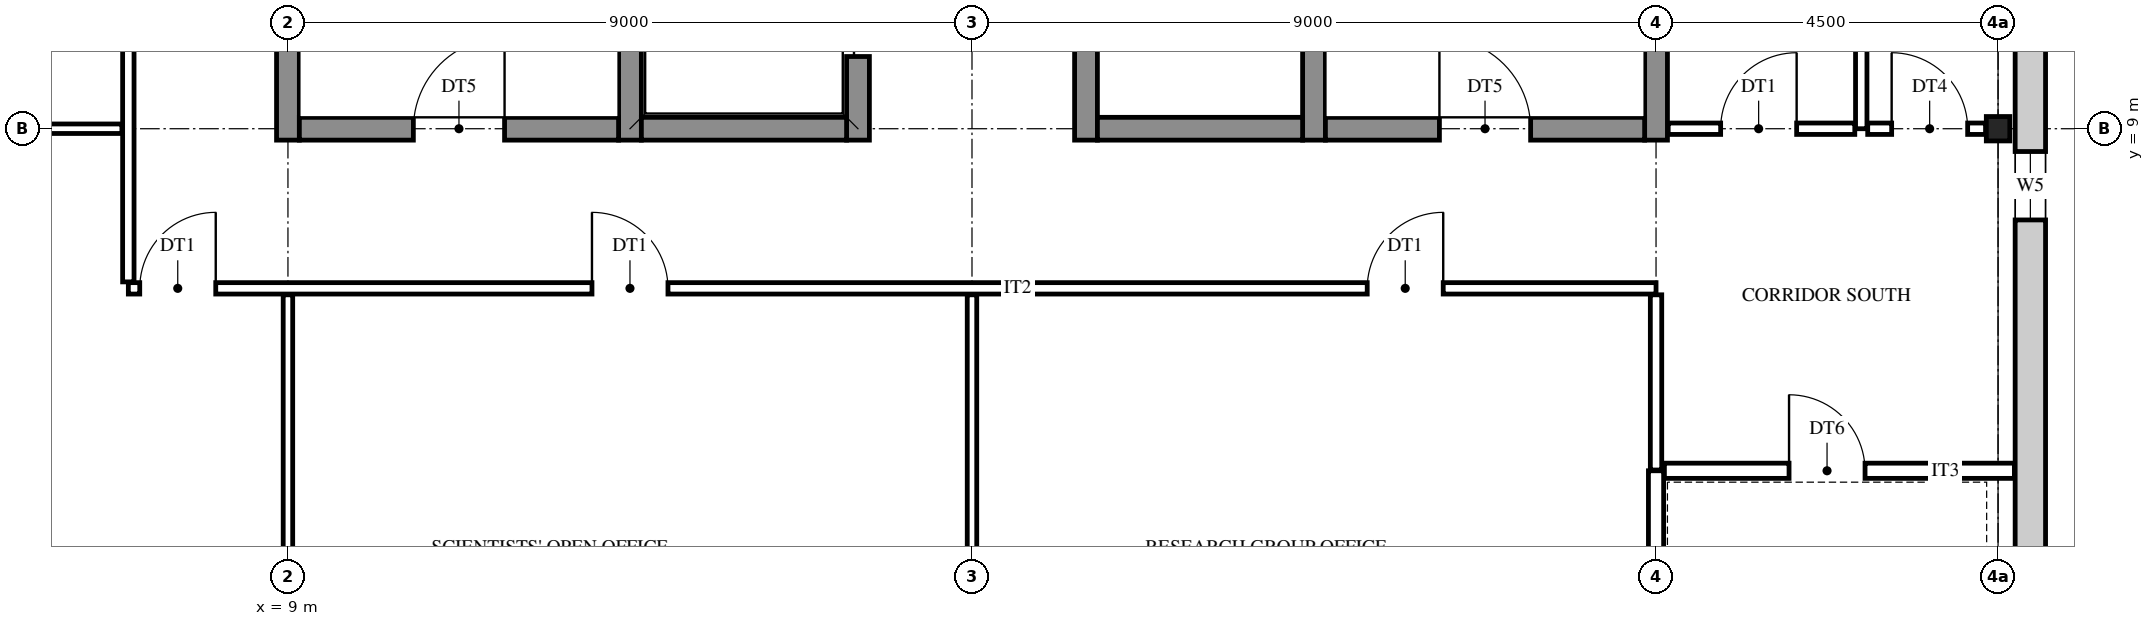
"""IFC4 building model, lengths in metres.
Left out: names, types, materials, properties, quantities, classifications, styles, units other than length and angle.
Written with IfcOpenShell. Run it as: python <this file> out.ifc"""

import sys

from ifc_helpers import new_model, si_unit, direction, frame, frame_2d, origin, origin_2d, place, context, subcontext, project, spatial, rectangle, i_section, extrude, element, fill, save


model = new_model("IFC4")
c1 = context("Model", 3, precision=1e-05, world=origin(), true_north=direction((0.0, 1.0)))
c2 = subcontext(c1, "Body", "Model", "MODEL_VIEW")
j1 = project(units=[si_unit("LENGTHUNIT", "METRE"), si_unit("PLANEANGLEUNIT", "RADIAN")], contexts=[c1])
p1 = place(None, origin())
s1 = spatial("IfcSite", under=j1, at=p1, CompositionType="ELEMENT")
p2 = place(p1, origin())
s2 = spatial("IfcBuilding", under=s1, at=p2, CompositionType="ELEMENT")
p3 = place(p2, frame((0.0, 0.0, 52.8)))
s3 = spatial("IfcBuildingStorey", under=s2, at=p3, CompositionType="ELEMENT", Elevation=52.8)
p4 = place(p3, frame((31.5, 9.0, 0.0), z_axis=(0.0, 0.0, 1.0), x_axis=(1.0, 0.0, 0.0)))
e1 = element("IfcColumn", 1, at=p4, inside=s3, PredefinedType="COLUMN", context=c2, shape_type="SweptSolid", body=[
    extrude(i_section(OverallWidth=0.309, OverallDepth=0.321, WebThickness=0.014, FlangeThickness=0.022, FilletRadius=0.017, at=origin_2d()), origin(), (0.0, 0.0, 1.0), 4.2),
])
for number, where, z_axis, x_axis in (
    (2, (9.0, 8.85, 0.0), (0.0, 0.0, 1.0), (0.0, 1.0, 0.0)),
    (3, (13.5, 8.85, 0.0), (0.0, 0.0, 1.0), (0.0, 1.0, 0.0)),
):
    element("IfcWall", number, at=place(p3, frame(where, z_axis=z_axis, x_axis=x_axis)), inside=s3, PredefinedType="SHEAR", context=c2, shape_type="SweptSolid", body=[
        extrude(rectangle(XDim=9.3, YDim=0.3, at=frame_2d((4.65, 0.0))), origin(), (0.0, 0.0, 1.0), 4.2),
    ])
p5 = place(p3, frame((16.5, 8.85, 0.0), z_axis=(0.0, 0.0, 1.0), x_axis=(0.0, 1.0, 0.0)))
e4 = element("IfcWall", 4, at=p5, inside=s3, PredefinedType="SHEAR", context=c2, shape_type="SweptSolid", body=[
    extrude(rectangle(XDim=9.3, YDim=0.3, at=frame_2d((4.65, 0.0))), origin(), (0.0, 0.0, 1.0), 4.2),
])
p6 = place(p5, frame((1.1, 0.0, 0.0)))
e5 = element("IfcOpeningElement", 5, at=p6, cuts=e4, PredefinedType="OPENING", context=c2, shape_type="SweptSolid", body=[
    extrude(rectangle(XDim=1.1, YDim=2.1, at=frame_2d((0.55, 1.05))), frame((0.0, 0.16, 0.0), z_axis=(0.0, -1.0, 0.0), x_axis=(1.0, 0.0, 0.0)), (0.0, 0.0, 1.0), 0.32),
])
p7 = place(p5, frame((4.1, 0.0, 0.0)))
e6 = element("IfcOpeningElement", 6, at=p7, cuts=e4, PredefinedType="OPENING", context=c2, shape_type="SweptSolid", body=[
    extrude(rectangle(XDim=1.1, YDim=2.1, at=frame_2d((0.55, 1.05))), frame((0.0, 0.16, 0.0), z_axis=(0.0, -1.0, 0.0), x_axis=(1.0, 0.0, 0.0)), (0.0, 0.0, 1.0), 0.32),
])
p8 = place(p3, frame((19.5, 8.85, 0.0), z_axis=(0.0, 0.0, 1.0), x_axis=(0.0, 1.0, 0.0)))
e7 = element("IfcWall", 7, at=p8, inside=s3, PredefinedType="SHEAR", context=c2, shape_type="SweptSolid", body=[
    extrude(rectangle(XDim=9.3, YDim=0.3, at=frame_2d((4.65, 0.0))), origin(), (0.0, 0.0, 1.0), 4.2),
])
p9 = place(p8, frame((3.95, 0.0, 0.0)))
e8 = element("IfcOpeningElement", 8, at=p9, cuts=e7, PredefinedType="OPENING", context=c2, shape_type="SweptSolid", body=[
    extrude(rectangle(XDim=1.4, YDim=2.1, at=frame_2d((0.7, 1.05))), frame((0.0, 0.16, 0.0), z_axis=(0.0, -1.0, 0.0), x_axis=(1.0, 0.0, 0.0)), (0.0, 0.0, 1.0), 0.32),
])
p10 = place(p8, frame((7.1, 0.0, 0.0)))
e9 = element("IfcOpeningElement", 9, at=p10, cuts=e7, PredefinedType="OPENING", context=c2, shape_type="SweptSolid", body=[
    extrude(rectangle(XDim=1.1, YDim=2.1, at=frame_2d((0.55, 1.05))), frame((0.0, 0.16, 0.0), z_axis=(0.0, -1.0, 0.0), x_axis=(1.0, 0.0, 0.0)), (0.0, 0.0, 1.0), 0.32),
])
for number, where, z_axis, x_axis in (
    (10, (22.5, 8.85, 0.0), (0.0, 0.0, 1.0), (0.0, 1.0, 0.0)),
    (11, (27.0, 8.85, 0.0), (0.0, 0.0, 1.0), (0.0, 1.0, 0.0)),
):
    element("IfcWall", number, at=place(p3, frame(where, z_axis=z_axis, x_axis=x_axis)), inside=s3, PredefinedType="SHEAR", context=c2, shape_type="SweptSolid", body=[
        extrude(rectangle(XDim=9.3, YDim=0.3, at=frame_2d((4.65, 0.0))), origin(), (0.0, 0.0, 1.0), 4.2),
    ])
p11 = place(p3, frame((9.15, 9.0, 0.0), z_axis=(0.0, 0.0, 1.0), x_axis=(1.0, 0.0, 0.0)))
e12 = element("IfcWall", 12, at=p11, inside=s3, PredefinedType="SHEAR", context=c2, shape_type="SweptSolid", body=[
    extrude(rectangle(XDim=4.2, YDim=0.3, at=frame_2d((2.1, 0.0))), origin(), (0.0, 0.0, 1.0), 4.2),
])
p12 = place(p11, frame((1.5, 0.0, 0.0)))
e13 = element("IfcOpeningElement", 13, at=p12, cuts=e12, PredefinedType="OPENING", context=c2, shape_type="SweptSolid", body=[
    extrude(rectangle(XDim=1.2, YDim=2.1, at=frame_2d((0.6, 1.05))), frame((0.0, 0.16, 0.0), z_axis=(0.0, -1.0, 0.0), x_axis=(1.0, 0.0, 0.0)), (0.0, 0.0, 1.0), 0.32),
])
for number, where, z_axis, x_axis in (
    (14, (13.65, 9.0, 0.0), (0.0, 0.0, 1.0), (1.0, 0.0, 0.0)),
    (15, (19.65, 9.0, 0.0), (0.0, 0.0, 1.0), (1.0, 0.0, 0.0)),
):
    element("IfcWall", number, at=place(p3, frame(where, z_axis=z_axis, x_axis=x_axis)), inside=s3, PredefinedType="SHEAR", context=c2, shape_type="SweptSolid", body=[
        extrude(rectangle(XDim=2.7, YDim=0.3, at=frame_2d((1.35, 0.0))), origin(), (0.0, 0.0, 1.0), 4.2),
    ])
p13 = place(p3, frame((22.65, 9.0, 0.0), z_axis=(0.0, 0.0, 1.0), x_axis=(1.0, 0.0, 0.0)))
e16 = element("IfcWall", 16, at=p13, inside=s3, PredefinedType="SHEAR", context=c2, shape_type="SweptSolid", body=[
    extrude(rectangle(XDim=4.2, YDim=0.3, at=frame_2d((2.1, 0.0))), origin(), (0.0, 0.0, 1.0), 4.2),
])
p14 = place(p13, frame((1.5, 0.0, 0.0)))
e17 = element("IfcOpeningElement", 17, at=p14, cuts=e16, PredefinedType="OPENING", context=c2, shape_type="SweptSolid", body=[
    extrude(rectangle(XDim=1.2, YDim=2.1, at=frame_2d((0.6, 1.05))), frame((0.0, 0.16, 0.0), z_axis=(0.0, -1.0, 0.0), x_axis=(1.0, 0.0, 0.0)), (0.0, 0.0, 1.0), 0.32),
])
p15 = place(p3, frame((31.925, 27.225, 0.0), z_axis=(0.0, 0.0, 1.0), x_axis=(0.0, -1.0, 0.0)))
e18 = element("IfcWall", 18, at=p15, inside=s3, PredefinedType="STANDARD", context=c2, shape_type="SweptSolid", body=[
    extrude(rectangle(XDim=27.45, YDim=0.4, at=frame_2d((13.725, 0.0))), origin(), (0.0, 0.0, 1.0), 4.2),
])
p16 = place(p15, frame((26.025, 0.0, 0.9)))
e19 = element("IfcOpeningElement", 19, at=p16, cuts=e18, PredefinedType="OPENING", context=c2, shape_type="SweptSolid", body=[
    extrude(rectangle(XDim=0.9, YDim=2.0, at=frame_2d((0.45, 1.0))), frame((0.0, 0.21, 0.0), z_axis=(0.0, -1.0, 0.0), x_axis=(1.0, 0.0, 0.0)), (0.0, 0.0, 1.0), 0.42),
])
p17 = place(p15, frame((18.525, 0.0, 0.9)))
e20 = element("IfcOpeningElement", 20, at=p17, cuts=e18, PredefinedType="OPENING", context=c2, shape_type="SweptSolid", body=[
    extrude(rectangle(XDim=0.9, YDim=2.0, at=frame_2d((0.45, 1.0))), frame((0.0, 0.21, 0.0), z_axis=(0.0, -1.0, 0.0), x_axis=(1.0, 0.0, 0.0)), (0.0, 0.0, 1.0), 0.42),
])
p18 = place(p15, frame((15.675, 0.0, 1.6)))
e21 = element("IfcOpeningElement", 21, at=p18, cuts=e18, PredefinedType="OPENING", context=c2, shape_type="SweptSolid", body=[
    extrude(rectangle(XDim=0.6, YDim=0.9, at=frame_2d((0.3, 0.45))), frame((0.0, 0.21, 0.0), z_axis=(0.0, -1.0, 0.0), x_axis=(1.0, 0.0, 0.0)), (0.0, 0.0, 1.0), 0.42),
])
p19 = place(p15, frame((11.175, 0.0, 1.6)))
e22 = element("IfcOpeningElement", 22, at=p19, cuts=e18, PredefinedType="OPENING", context=c2, shape_type="SweptSolid", body=[
    extrude(rectangle(XDim=0.6, YDim=0.9, at=frame_2d((0.3, 0.45))), frame((0.0, 0.21, 0.0), z_axis=(0.0, -1.0, 0.0), x_axis=(1.0, 0.0, 0.0)), (0.0, 0.0, 1.0), 0.42),
])
p20 = place(p15, frame((8.025, 0.0, 0.9)))
e23 = element("IfcOpeningElement", 23, at=p20, cuts=e18, PredefinedType="OPENING", context=c2, shape_type="SweptSolid", body=[
    extrude(rectangle(XDim=0.9, YDim=2.0, at=frame_2d((0.45, 1.0))), frame((0.0, 0.21, 0.0), z_axis=(0.0, -1.0, 0.0), x_axis=(1.0, 0.0, 0.0)), (0.0, 0.0, 1.0), 0.42),
])
p21 = place(p15, frame((0.525, 0.0, 0.9)))
e24 = element("IfcOpeningElement", 24, at=p21, cuts=e18, PredefinedType="OPENING", context=c2, shape_type="SweptSolid", body=[
    extrude(rectangle(XDim=0.9, YDim=2.0, at=frame_2d((0.45, 1.0))), frame((0.0, 0.21, 0.0), z_axis=(0.0, -1.0, 0.0), x_axis=(1.0, 0.0, 0.0)), (0.0, 0.0, 1.0), 0.42),
])
p22 = place(p3, frame((6.9, 6.985, 0.0), z_axis=(0.0, 0.0, 1.0), x_axis=(0.0, 1.0, 0.0)))
e25 = element("IfcWall", 25, at=p22, inside=s3, PredefinedType="PARTITIONING", context=c2, shape_type="SweptSolid", body=[
    extrude(rectangle(XDim=13.03, YDim=0.15, at=frame_2d((6.515, 0.0))), origin(), (0.0, 0.0, 1.0), 3.542),
])
p23 = place(p22, frame((11.565, 0.0, 0.0)))
e26 = element("IfcOpeningElement", 26, at=p23, cuts=e25, PredefinedType="OPENING", context=c2, shape_type="SweptSolid", body=[
    extrude(rectangle(XDim=1.0, YDim=2.1, at=frame_2d((0.5, 1.05))), frame((0.0, 0.085, 0.0), z_axis=(0.0, -1.0, 0.0), x_axis=(1.0, 0.0, 0.0)), (0.0, 0.0, 1.0), 0.17),
])
p24 = place(p22, frame((3.765, 0.0, 0.0)))
e27 = element("IfcOpeningElement", 27, at=p24, cuts=e25, PredefinedType="OPENING", context=c2, shape_type="SweptSolid", body=[
    extrude(rectangle(XDim=1.0, YDim=2.1, at=frame_2d((0.5, 1.05))), frame((0.0, 0.085, 0.0), z_axis=(0.0, -1.0, 0.0), x_axis=(1.0, 0.0, 0.0)), (0.0, 0.0, 1.0), 0.17),
])
p25 = place(p22, frame((8.265, 0.0, 0.0)))
e28 = element("IfcOpeningElement", 28, at=p25, cuts=e25, PredefinedType="OPENING", context=c2, shape_type="SweptSolid", body=[
    extrude(rectangle(XDim=1.0, YDim=2.1, at=frame_2d((0.5, 1.05))), frame((0.0, 0.085, 0.0), z_axis=(0.0, -1.0, 0.0), x_axis=(1.0, 0.0, 0.0)), (0.0, 0.0, 1.0), 0.17),
])
for number, where, z_axis, x_axis in (
    (29, (9.0, 0.17, 0.0), (0.0, 0.0, 1.0), (0.0, 1.0, 0.0)),
    (30, (18.0, 0.17, 0.0), (0.0, 0.0, 1.0), (0.0, 1.0, 0.0)),
):
    element("IfcWall", number, at=place(p3, frame(where, z_axis=z_axis, x_axis=x_axis)), inside=s3, PredefinedType="PARTITIONING", context=c2, shape_type="SweptSolid", body=[
        extrude(rectangle(XDim=6.645, YDim=0.125, at=frame_2d((3.322, 0.0))), origin(), (0.0, 0.0, 1.0), 3.542),
    ])
p26 = place(p3, frame((27.0, 0.17, 0.0), z_axis=(0.0, 0.0, 1.0), x_axis=(0.0, 1.0, 0.0)))
e31 = element("IfcWall", 31, at=p26, inside=s3, PredefinedType="PARTITIONING", context=c2, shape_type="SweptSolid", body=[
    extrude(rectangle(XDim=4.33, YDim=0.2, at=frame_2d((2.165, 0.0))), origin(), (0.0, 0.0, 1.0), 3.542),
])
p27 = place(p3, frame((27.0, 4.51, 0.0), z_axis=(0.0, 0.0, 1.0), x_axis=(0.0, 1.0, 0.0)))
e32 = element("IfcWall", 32, at=p27, inside=s3, PredefinedType="PARTITIONING", context=c2, shape_type="SweptSolid", body=[
    extrude(rectangle(XDim=2.305, YDim=0.15, at=frame_2d((1.152, 0.0))), origin(), (0.0, 0.0, 1.0), 3.542),
])
p28 = place(p3, frame((29.7, 9.0, 0.0), z_axis=(0.0, 0.0, 1.0), x_axis=(0.0, 1.0, 0.0)))
e33 = element("IfcWall", 33, at=p28, inside=s3, PredefinedType="PARTITIONING", context=c2, shape_type="SweptSolid", body=[
    extrude(rectangle(XDim=6.3, YDim=0.15, at=frame_2d((3.15, 0.0))), origin(), (0.0, 0.0, 1.0), 3.542),
])
p29 = place(p28, frame((4.0, 0.0, 0.0)))
e34 = element("IfcOpeningElement", 34, at=p29, cuts=e33, PredefinedType="OPENING", context=c2, shape_type="SweptSolid", body=[
    extrude(rectangle(XDim=1.0, YDim=2.1, at=frame_2d((0.5, 1.05))), frame((0.0, 0.085, 0.0), z_axis=(0.0, -1.0, 0.0), x_axis=(1.0, 0.0, 0.0)), (0.0, 0.0, 1.0), 0.17),
])
p30 = place(p3, frame((27.11, 4.5, 0.0), z_axis=(0.0, 0.0, 1.0), x_axis=(1.0, 0.0, 0.0)))
e35 = element("IfcWall", 35, at=p30, inside=s3, PredefinedType="PARTITIONING", context=c2, shape_type="SweptSolid", body=[
    extrude(rectangle(XDim=4.605, YDim=0.2, at=frame_2d((2.302, 0.0))), origin(), (0.0, 0.0, 1.0), 3.542),
])
p31 = place(p30, frame((1.64, 0.0, 0.0)))
e36 = element("IfcOpeningElement", 36, at=p31, cuts=e35, PredefinedType="OPENING", context=c2, shape_type="SweptSolid", body=[
    extrude(rectangle(XDim=1.0, YDim=2.1, at=frame_2d((0.5, 1.05))), frame((0.0, 0.11, 0.0), z_axis=(0.0, -1.0, 0.0), x_axis=(1.0, 0.0, 0.0)), (0.0, 0.0, 1.0), 0.22),
])
p32 = place(p3, frame((6.9, 6.9, 0.0), z_axis=(0.0, 0.0, 1.0), x_axis=(1.0, 0.0, 0.0)))
e37 = element("IfcWall", 37, at=p32, inside=s3, PredefinedType="PARTITIONING", context=c2, shape_type="SweptSolid", body=[
    extrude(rectangle(XDim=20.1, YDim=0.15, at=frame_2d((10.05, 0.0))), origin(), (0.0, 0.0, 1.0), 3.542),
])
p33 = place(p32, frame((0.15, 0.0, 0.0)))
e38 = element("IfcOpeningElement", 38, at=p33, cuts=e37, PredefinedType="OPENING", context=c2, shape_type="SweptSolid", body=[
    extrude(rectangle(XDim=1.0, YDim=2.1, at=frame_2d((0.5, 1.05))), frame((0.0, 0.085, 0.0), z_axis=(0.0, -1.0, 0.0), x_axis=(1.0, 0.0, 0.0)), (0.0, 0.0, 1.0), 0.17),
])
p34 = place(p32, frame((6.1, 0.0, 0.0)))
e39 = element("IfcOpeningElement", 39, at=p34, cuts=e37, PredefinedType="OPENING", context=c2, shape_type="SweptSolid", body=[
    extrude(rectangle(XDim=1.0, YDim=2.1, at=frame_2d((0.5, 1.05))), frame((0.0, 0.085, 0.0), z_axis=(0.0, -1.0, 0.0), x_axis=(1.0, 0.0, 0.0)), (0.0, 0.0, 1.0), 0.17),
])
p35 = place(p32, frame((16.3, 0.0, 0.0)))
e40 = element("IfcOpeningElement", 40, at=p35, cuts=e37, PredefinedType="OPENING", context=c2, shape_type="SweptSolid", body=[
    extrude(rectangle(XDim=1.0, YDim=2.1, at=frame_2d((0.5, 1.05))), frame((0.0, 0.085, 0.0), z_axis=(0.0, -1.0, 0.0), x_axis=(1.0, 0.0, 0.0)), (0.0, 0.0, 1.0), 0.17),
])
p36 = place(p3, frame((0.165, 9.0, 0.0), z_axis=(0.0, 0.0, 1.0), x_axis=(1.0, 0.0, 0.0)))
e41 = element("IfcWall", 41, at=p36, inside=s3, PredefinedType="PARTITIONING", context=c2, shape_type="SweptSolid", body=[
    extrude(rectangle(XDim=6.65, YDim=0.125, at=frame_2d((3.325, 0.0))), origin(), (0.0, 0.0, 1.0), 3.542),
])
p37 = place(p3, frame((27.16, 9.0, 0.0), z_axis=(0.0, 0.0, 1.0), x_axis=(1.0, 0.0, 0.0)))
e42 = element("IfcWall", 42, at=p37, inside=s3, PredefinedType="PARTITIONING", context=c2, shape_type="SweptSolid", body=[
    extrude(rectangle(XDim=2.455, YDim=0.15, at=frame_2d((1.228, 0.0))), origin(), (0.0, 0.0, 1.0), 3.542),
])
p38 = place(p37, frame((0.69, 0.0, 0.0)))
e43 = element("IfcOpeningElement", 43, at=p38, cuts=e42, PredefinedType="OPENING", context=c2, shape_type="SweptSolid", body=[
    extrude(rectangle(XDim=1.0, YDim=2.1, at=frame_2d((0.5, 1.05))), frame((0.0, 0.085, 0.0), z_axis=(0.0, -1.0, 0.0), x_axis=(1.0, 0.0, 0.0)), (0.0, 0.0, 1.0), 0.17),
])
p39 = place(p3, frame((29.785, 9.0, 0.0), z_axis=(0.0, 0.0, 1.0), x_axis=(1.0, 0.0, 0.0)))
e44 = element("IfcWall", 44, at=p39, inside=s3, PredefinedType="PARTITIONING", context=c2, shape_type="SweptSolid", body=[
    extrude(rectangle(XDim=1.551, YDim=0.15, at=frame_2d((0.775, 0.0))), origin(), (0.0, 0.0, 1.0), 3.542),
])
p40 = place(p39, frame((0.315, 0.0, 0.0)))
e45 = element("IfcOpeningElement", 45, at=p40, cuts=e44, PredefinedType="OPENING", context=c2, shape_type="SweptSolid", body=[
    extrude(rectangle(XDim=1.0, YDim=2.1, at=frame_2d((0.5, 1.05))), frame((0.0, 0.085, 0.0), z_axis=(0.0, -1.0, 0.0), x_axis=(1.0, 0.0, 0.0)), (0.0, 0.0, 1.0), 0.17),
])
p41 = place(p17, origin())
e46 = element("IfcWindow", 46, at=p41, inside=s3, PartitioningType="SINGLE_PANEL", PredefinedType="WINDOW", context=c2, shape_type="SweptSolid", body=[
    extrude(rectangle(XDim=0.9, YDim=2.0, at=frame_2d((0.45, 1.0))), frame((0.0, 0.03, 0.0), z_axis=(0.0, -1.0, 0.0), x_axis=(1.0, 0.0, 0.0)), (0.0, 0.0, 1.0), 0.06),
])
fill(e20, e46)
p42 = place(p12, origin())
e47 = element("IfcDoor", 47, at=p42, inside=s3, OperationType="SINGLE_SWING_RIGHT", PredefinedType="DOOR", context=c2, shape_type="SweptSolid", body=[
    extrude(rectangle(XDim=1.2, YDim=2.1, at=frame_2d((0.6, 1.05))), frame((0.0, 0.025, 0.0), z_axis=(0.0, -1.0, 0.0), x_axis=(1.0, 0.0, 0.0)), (0.0, 0.0, 1.0), 0.05),
])
fill(e13, e47)
p43 = place(p14, origin())
e48 = element("IfcDoor", 48, at=p43, inside=s3, OperationType="SINGLE_SWING_LEFT", PredefinedType="DOOR", context=c2, shape_type="SweptSolid", body=[
    extrude(rectangle(XDim=1.2, YDim=2.1, at=frame_2d((0.6, 1.05))), frame((0.0, 0.025, 0.0), z_axis=(0.0, -1.0, 0.0), x_axis=(1.0, 0.0, 0.0)), (0.0, 0.0, 1.0), 0.05),
])
fill(e17, e48)
p44 = place(p38, origin())
e49 = element("IfcDoor", 49, at=p44, inside=s3, OperationType="SINGLE_SWING_RIGHT", PredefinedType="DOOR", context=c2, shape_type="SweptSolid", body=[
    extrude(rectangle(XDim=1.0, YDim=2.1, at=frame_2d((0.5, 1.05))), frame((0.0, 0.025, 0.0), z_axis=(0.0, -1.0, 0.0), x_axis=(1.0, 0.0, 0.0)), (0.0, 0.0, 1.0), 0.05),
])
fill(e43, e49)
p45 = place(p40, origin())
e50 = element("IfcDoor", 50, at=p45, inside=s3, OperationType="SINGLE_SWING_LEFT", PredefinedType="DOOR", context=c2, shape_type="SweptSolid", body=[
    extrude(rectangle(XDim=1.0, YDim=2.1, at=frame_2d((0.5, 1.05))), frame((0.0, 0.025, 0.0), z_axis=(0.0, -1.0, 0.0), x_axis=(1.0, 0.0, 0.0)), (0.0, 0.0, 1.0), 0.05),
])
fill(e45, e50)
p46 = place(p31, frame((1.0, 0.0, 0.0), z_axis=(0.0, 0.0, 1.0), x_axis=(-1.0, 0.0, 0.0)))
e51 = element("IfcDoor", 51, at=p46, inside=s3, OperationType="SINGLE_SWING_LEFT", PredefinedType="DOOR", context=c2, shape_type="SweptSolid", body=[
    extrude(rectangle(XDim=1.0, YDim=2.1, at=frame_2d((0.5, 1.05))), frame((0.0, 0.025, 0.0), z_axis=(0.0, -1.0, 0.0), x_axis=(1.0, 0.0, 0.0)), (0.0, 0.0, 1.0), 0.05),
])
fill(e36, e51)
p47 = place(p33, frame((1.0, 0.0, 0.0), z_axis=(0.0, 0.0, 1.0), x_axis=(-1.0, 0.0, 0.0)))
e52 = element("IfcDoor", 52, at=p47, inside=s3, OperationType="SINGLE_SWING_RIGHT", PredefinedType="DOOR", context=c2, shape_type="SweptSolid", body=[
    extrude(rectangle(XDim=1.0, YDim=2.1, at=frame_2d((0.5, 1.05))), frame((0.0, 0.025, 0.0), z_axis=(0.0, -1.0, 0.0), x_axis=(1.0, 0.0, 0.0)), (0.0, 0.0, 1.0), 0.05),
])
fill(e38, e52)
p48 = place(p34, frame((1.0, 0.0, 0.0), z_axis=(0.0, 0.0, 1.0), x_axis=(-1.0, 0.0, 0.0)))
e53 = element("IfcDoor", 53, at=p48, inside=s3, OperationType="SINGLE_SWING_LEFT", PredefinedType="DOOR", context=c2, shape_type="SweptSolid", body=[
    extrude(rectangle(XDim=1.0, YDim=2.1, at=frame_2d((0.5, 1.05))), frame((0.0, 0.025, 0.0), z_axis=(0.0, -1.0, 0.0), x_axis=(1.0, 0.0, 0.0)), (0.0, 0.0, 1.0), 0.05),
])
fill(e39, e53)
p49 = place(p35, frame((1.0, 0.0, 0.0), z_axis=(0.0, 0.0, 1.0), x_axis=(-1.0, 0.0, 0.0)))
e54 = element("IfcDoor", 54, at=p49, inside=s3, OperationType="SINGLE_SWING_RIGHT", PredefinedType="DOOR", context=c2, shape_type="SweptSolid", body=[
    extrude(rectangle(XDim=1.0, YDim=2.1, at=frame_2d((0.5, 1.05))), frame((0.0, 0.025, 0.0), z_axis=(0.0, -1.0, 0.0), x_axis=(1.0, 0.0, 0.0)), (0.0, 0.0, 1.0), 0.05),
])
fill(e40, e54)
p50 = place(p6, origin())
e55 = element("IfcDoor", 55, at=p50, inside=s3, OperationType="DOUBLE_DOOR_SLIDING", PredefinedType="DOOR", context=c2, shape_type="SweptSolid", body=[
    extrude(rectangle(XDim=1.1, YDim=2.1, at=frame_2d((0.55, 1.05))), frame((0.0, 0.025, 0.0), z_axis=(0.0, -1.0, 0.0), x_axis=(1.0, 0.0, 0.0)), (0.0, 0.0, 1.0), 0.05),
])
fill(e5, e55)
save(model, sys.argv[1])
